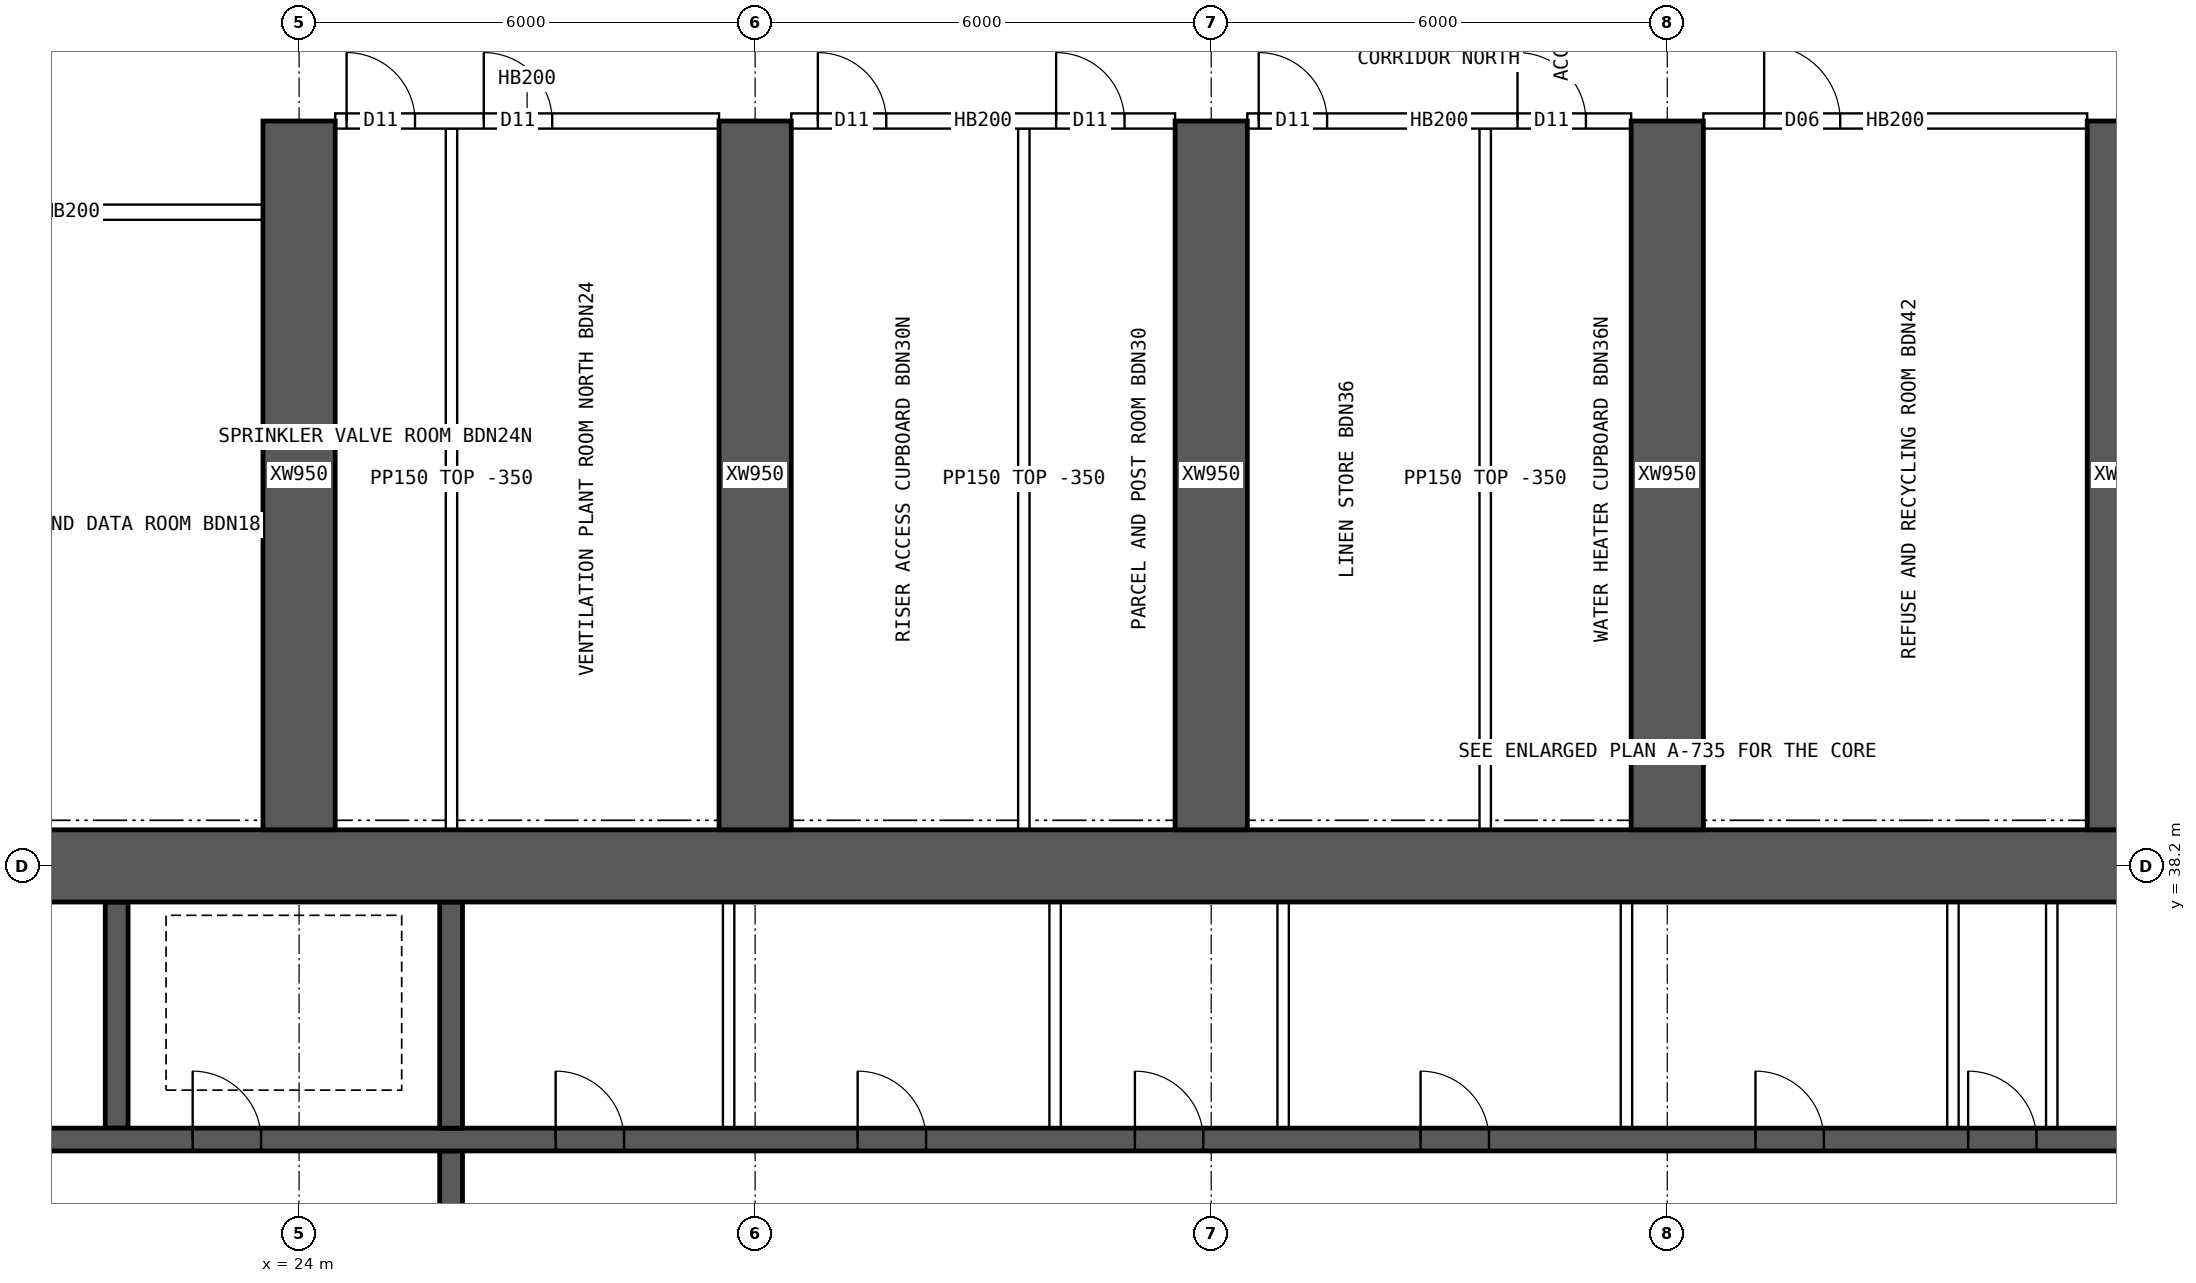
"""IFC4 building model, lengths in metres.
Left out: names, types, materials, properties, quantities, classifications, styles, units other than length and angle.
Written with IfcOpenShell. Run it as: python <this file> out.ifc"""

import sys

from ifc_helpers import new_model, si_unit, direction, frame, frame_2d, origin, place, context, subcontext, project, spatial, rectangle, extrude, element, fill, save


model = new_model("IFC4")
c1 = context("Model", 3, precision=1e-05, world=origin(), true_north=direction((0.0, 1.0)))
c2 = subcontext(c1, "Body", "Model", "MODEL_VIEW")
j1 = project(units=[si_unit("LENGTHUNIT", "METRE"), si_unit("PLANEANGLEUNIT", "RADIAN")], contexts=[c1])
p1 = place(None, origin())
s1 = spatial("IfcSite", under=j1, at=p1, CompositionType="ELEMENT")
p2 = place(p1, origin())
s2 = spatial("IfcBuilding", under=s1, at=p2, CompositionType="ELEMENT")
p3 = place(p2, frame((0.0, 0.0, 129.4)))
s3 = spatial("IfcBuildingStorey", under=s2, at=p3, CompositionType="ELEMENT", Elevation=129.4)
p4 = place(p3, frame((18.0, 38.2, 0.0), z_axis=(0.0, 0.0, 1.0), x_axis=(1.0, 0.0, 0.0)))
e1 = element("IfcWall", 1, at=p4, inside=s3, PredefinedType="SHEAR", context=c2, shape_type="SweptSolid", body=[
    extrude(rectangle(XDim=48.0, YDim=0.95, at=frame_2d((24.0, 0.0))), origin(), (0.0, 0.0, 1.0), 3.75),
])
p5 = place(p3, frame((18.475, 34.6, 0.0), z_axis=(0.0, 0.0, 1.0), x_axis=(1.0, 0.0, 0.0)))
e2 = element("IfcWall", 2, at=p5, inside=s3, PredefinedType="SHEAR", context=c2, shape_type="SweptSolid", body=[
    extrude(rectangle(XDim=47.05, YDim=0.3, at=frame_2d((23.525, 0.0))), origin(), (0.0, 0.0, 1.0), 3.75),
])
p6 = place(p5, frame((0.9, 0.0, 0.0)))
e3 = element("IfcOpeningElement", 3, at=p6, cuts=e2, PredefinedType="OPENING", context=c2, shape_type="SweptSolid", body=[
    extrude(rectangle(XDim=1.1, YDim=2.1, at=frame_2d((0.55, 1.05))), frame((0.0, 0.16, 0.0), z_axis=(0.0, -1.0, 0.0), x_axis=(1.0, 0.0, 0.0)), (0.0, 0.0, 1.0), 0.32),
])
p7 = place(p5, frame((45.05, 0.0, 0.0)))
e4 = element("IfcOpeningElement", 4, at=p7, cuts=e2, PredefinedType="OPENING", context=c2, shape_type="SweptSolid", body=[
    extrude(rectangle(XDim=1.1, YDim=2.1, at=frame_2d((0.55, 1.05))), frame((0.0, 0.16, 0.0), z_axis=(0.0, -1.0, 0.0), x_axis=(1.0, 0.0, 0.0)), (0.0, 0.0, 1.0), 0.32),
])
p8 = place(p5, frame((4.125, 0.0, 0.0)))
e5 = element("IfcOpeningElement", 5, at=p8, cuts=e2, PredefinedType="OPENING", context=c2, shape_type="SweptSolid", body=[
    extrude(rectangle(XDim=0.9, YDim=2.1, at=frame_2d((0.45, 1.05))), frame((0.0, 0.16, 0.0), z_axis=(0.0, -1.0, 0.0), x_axis=(1.0, 0.0, 0.0)), (0.0, 0.0, 1.0), 0.32),
])
p9 = place(p5, frame((42.025, 0.0, 0.0)))
e6 = element("IfcOpeningElement", 6, at=p9, cuts=e2, PredefinedType="OPENING", context=c2, shape_type="SweptSolid", body=[
    extrude(rectangle(XDim=0.9, YDim=2.1, at=frame_2d((0.45, 1.05))), frame((0.0, 0.16, 0.0), z_axis=(0.0, -1.0, 0.0), x_axis=(1.0, 0.0, 0.0)), (0.0, 0.0, 1.0), 0.32),
])
p10 = place(p5, frame((8.9, 0.0, 0.0)))
e7 = element("IfcOpeningElement", 7, at=p10, cuts=e2, PredefinedType="OPENING", context=c2, shape_type="SweptSolid", body=[
    extrude(rectangle(XDim=0.9, YDim=2.1, at=frame_2d((0.45, 1.05))), frame((0.0, 0.16, 0.0), z_axis=(0.0, -1.0, 0.0), x_axis=(1.0, 0.0, 0.0)), (0.0, 0.0, 1.0), 0.32),
])
p11 = place(p5, frame((12.874, 0.0, 0.0)))
e8 = element("IfcOpeningElement", 8, at=p11, cuts=e2, PredefinedType="OPENING", context=c2, shape_type="SweptSolid", body=[
    extrude(rectangle(XDim=0.9, YDim=2.1, at=frame_2d((0.45, 1.05))), frame((0.0, 0.16, 0.0), z_axis=(0.0, -1.0, 0.0), x_axis=(1.0, 0.0, 0.0)), (0.0, 0.0, 1.0), 0.32),
])
p12 = place(p5, frame((16.521, 0.0, 0.0)))
e9 = element("IfcOpeningElement", 9, at=p12, cuts=e2, PredefinedType="OPENING", context=c2, shape_type="SweptSolid", body=[
    extrude(rectangle(XDim=0.9, YDim=2.1, at=frame_2d((0.45, 1.05))), frame((0.0, 0.16, 0.0), z_axis=(0.0, -1.0, 0.0), x_axis=(1.0, 0.0, 0.0)), (0.0, 0.0, 1.0), 0.32),
])
p13 = place(p5, frame((20.28, 0.0, 0.0)))
e10 = element("IfcOpeningElement", 10, at=p13, cuts=e2, PredefinedType="OPENING", context=c2, shape_type="SweptSolid", body=[
    extrude(rectangle(XDim=0.9, YDim=2.1, at=frame_2d((0.45, 1.05))), frame((0.0, 0.16, 0.0), z_axis=(0.0, -1.0, 0.0), x_axis=(1.0, 0.0, 0.0)), (0.0, 0.0, 1.0), 0.32),
])
p14 = place(p5, frame((24.686, 0.0, 0.0)))
e11 = element("IfcOpeningElement", 11, at=p14, cuts=e2, PredefinedType="OPENING", context=c2, shape_type="SweptSolid", body=[
    extrude(rectangle(XDim=0.9, YDim=2.1, at=frame_2d((0.45, 1.05))), frame((0.0, 0.16, 0.0), z_axis=(0.0, -1.0, 0.0), x_axis=(1.0, 0.0, 0.0)), (0.0, 0.0, 1.0), 0.32),
])
p15 = place(p5, frame((27.483, 0.0, 0.0)))
e12 = element("IfcOpeningElement", 12, at=p15, cuts=e2, PredefinedType="OPENING", context=c2, shape_type="SweptSolid", body=[
    extrude(rectangle(XDim=0.9, YDim=2.1, at=frame_2d((0.45, 1.05))), frame((0.0, 0.16, 0.0), z_axis=(0.0, -1.0, 0.0), x_axis=(1.0, 0.0, 0.0)), (0.0, 0.0, 1.0), 0.32),
])
p16 = place(p5, frame((33.604, 0.0, 0.0)))
e13 = element("IfcOpeningElement", 13, at=p16, cuts=e2, PredefinedType="OPENING", context=c2, shape_type="SweptSolid", body=[
    extrude(rectangle(XDim=0.9, YDim=2.1, at=frame_2d((0.45, 1.05))), frame((0.0, 0.16, 0.0), z_axis=(0.0, -1.0, 0.0), x_axis=(1.0, 0.0, 0.0)), (0.0, 0.0, 1.0), 0.32),
])
p17 = place(p3, frame((26.0, 30.55, 0.0), z_axis=(0.0, 0.0, 1.0), x_axis=(0.0, 1.0, 0.0)))
e14 = element("IfcWall", 14, at=p17, inside=s3, PredefinedType="SHEAR", context=c2, shape_type="SweptSolid", body=[
    extrude(rectangle(XDim=3.9, YDim=0.3, at=frame_2d((1.95, 0.0))), origin(), (0.0, 0.0, 1.0), 3.75),
])
p18 = place(p17, frame((1.4, 0.0, 0.0)))
e15 = element("IfcOpeningElement", 15, at=p18, cuts=e14, PredefinedType="OPENING", context=c2, shape_type="SweptSolid", body=[
    extrude(rectangle(XDim=1.2, YDim=2.1, at=frame_2d((0.6, 1.05))), frame((0.0, 0.16, 0.0), z_axis=(0.0, -1.0, 0.0), x_axis=(1.0, 0.0, 0.0)), (0.0, 0.0, 1.0), 0.32),
])
for number, where, z_axis, x_axis in (
    (16, (21.6, 34.75, 0.0), (0.0, 0.0, 1.0), (0.0, 1.0, 0.0)),
    (17, (26.0, 34.75, 0.0), (0.0, 0.0, 1.0), (0.0, 1.0, 0.0)),
):
    element("IfcWall", number, at=place(p3, frame(where, z_axis=z_axis, x_axis=x_axis)), inside=s3, PredefinedType="SHEAR", context=c2, shape_type="SweptSolid", body=[
        extrude(rectangle(XDim=2.975, YDim=0.3, at=frame_2d((1.488, 0.0))), origin(), (0.0, 0.0, 1.0), 3.75),
    ])
for number, where, z_axis, x_axis in (
    (18, (24.0, 38.675, 0.0), (0.0, 0.0, 1.0), (0.0, 1.0, 0.0)),
    (19, (30.0, 38.675, 0.0), (0.0, 0.0, 1.0), (0.0, 1.0, 0.0)),
    (20, (36.0, 38.675, 0.0), (0.0, 0.0, 1.0), (0.0, 1.0, 0.0)),
    (21, (42.0, 38.675, 0.0), (0.0, 0.0, 1.0), (0.0, 1.0, 0.0)),
    (22, (48.0, 38.675, 0.0), (0.0, 0.0, 1.0), (0.0, 1.0, 0.0)),
):
    element("IfcWall", number, at=place(p3, frame(where, z_axis=z_axis, x_axis=x_axis)), inside=s3, PredefinedType="SHEAR", context=c2, shape_type="SweptSolid", body=[
        extrude(rectangle(XDim=9.325, YDim=0.95, at=frame_2d((4.663, 0.0))), origin(), (0.0, 0.0, 1.0), 3.75),
    ])
for number, where, z_axis, x_axis in (
    (23, (29.651, 34.75, 0.0), (0.0, 0.0, 1.0), (0.0, 1.0, 0.0)),
    (24, (33.946, 34.75, 0.0), (0.0, 0.0, 1.0), (0.0, 1.0, 0.0)),
    (25, (36.946, 34.75, 0.0), (0.0, 0.0, 1.0), (0.0, 1.0, 0.0)),
    (26, (41.463, 34.75, 0.0), (0.0, 0.0, 1.0), (0.0, 1.0, 0.0)),
    (27, (45.758, 34.75, 0.0), (0.0, 0.0, 1.0), (0.0, 1.0, 0.0)),
    (28, (47.058, 34.75, 0.0), (0.0, 0.0, 1.0), (0.0, 1.0, 0.0)),
):
    element("IfcWall", number, at=place(p3, frame(where, z_axis=z_axis, x_axis=x_axis)), inside=s3, PredefinedType="SOLIDWALL", context=c2, shape_type="SweptSolid", body=[
        extrude(rectangle(XDim=2.975, YDim=0.15, at=frame_2d((1.488, 0.0))), origin(), (0.0, 0.0, 1.0), 3.4),
    ])
p19 = place(p3, frame((24.475, 48.0, 0.0), z_axis=(0.0, 0.0, 1.0), x_axis=(1.0, 0.0, 0.0)))
e29 = element("IfcWall", 29, at=p19, inside=s3, PredefinedType="SOLIDWALL", context=c2, shape_type="SweptSolid", body=[
    extrude(rectangle(XDim=5.05, YDim=0.2, at=frame_2d((2.525, 0.0))), origin(), (0.0, 0.0, 1.0), 3.4),
])
p20 = place(p19, frame((0.15, 0.0, 0.0)))
e30 = element("IfcOpeningElement", 30, at=p20, cuts=e29, PredefinedType="OPENING", context=c2, shape_type="SweptSolid", body=[
    extrude(rectangle(XDim=0.9, YDim=2.1, at=frame_2d((0.45, 1.05))), frame((0.0, 0.11, 0.0), z_axis=(0.0, -1.0, 0.0), x_axis=(1.0, 0.0, 0.0)), (0.0, 0.0, 1.0), 0.22),
])
p21 = place(p19, frame((1.955, 0.0, 0.0)))
e31 = element("IfcOpeningElement", 31, at=p21, cuts=e29, PredefinedType="OPENING", context=c2, shape_type="SweptSolid", body=[
    extrude(rectangle(XDim=0.9, YDim=2.1, at=frame_2d((0.45, 1.05))), frame((0.0, 0.11, 0.0), z_axis=(0.0, -1.0, 0.0), x_axis=(1.0, 0.0, 0.0)), (0.0, 0.0, 1.0), 0.22),
])
p22 = place(p3, frame((30.475, 48.0, 0.0), z_axis=(0.0, 0.0, 1.0), x_axis=(1.0, 0.0, 0.0)))
e32 = element("IfcWall", 32, at=p22, inside=s3, PredefinedType="SOLIDWALL", context=c2, shape_type="SweptSolid", body=[
    extrude(rectangle(XDim=5.05, YDim=0.2, at=frame_2d((2.525, 0.0))), origin(), (0.0, 0.0, 1.0), 3.4),
])
p23 = place(p22, frame((0.35, 0.0, 0.0)))
e33 = element("IfcOpeningElement", 33, at=p23, cuts=e32, PredefinedType="OPENING", context=c2, shape_type="SweptSolid", body=[
    extrude(rectangle(XDim=0.9, YDim=2.1, at=frame_2d((0.45, 1.05))), frame((0.0, 0.11, 0.0), z_axis=(0.0, -1.0, 0.0), x_axis=(1.0, 0.0, 0.0)), (0.0, 0.0, 1.0), 0.22),
])
p24 = place(p22, frame((3.485, 0.0, 0.0)))
e34 = element("IfcOpeningElement", 34, at=p24, cuts=e32, PredefinedType="OPENING", context=c2, shape_type="SweptSolid", body=[
    extrude(rectangle(XDim=0.9, YDim=2.1, at=frame_2d((0.45, 1.05))), frame((0.0, 0.11, 0.0), z_axis=(0.0, -1.0, 0.0), x_axis=(1.0, 0.0, 0.0)), (0.0, 0.0, 1.0), 0.22),
])
p25 = place(p3, frame((36.475, 48.0, 0.0), z_axis=(0.0, 0.0, 1.0), x_axis=(1.0, 0.0, 0.0)))
e35 = element("IfcWall", 35, at=p25, inside=s3, PredefinedType="SOLIDWALL", context=c2, shape_type="SweptSolid", body=[
    extrude(rectangle(XDim=5.05, YDim=0.2, at=frame_2d((2.525, 0.0))), origin(), (0.0, 0.0, 1.0), 3.4),
])
p26 = place(p25, frame((0.15, 0.0, 0.0)))
e36 = element("IfcOpeningElement", 36, at=p26, cuts=e35, PredefinedType="OPENING", context=c2, shape_type="SweptSolid", body=[
    extrude(rectangle(XDim=0.9, YDim=2.1, at=frame_2d((0.45, 1.05))), frame((0.0, 0.11, 0.0), z_axis=(0.0, -1.0, 0.0), x_axis=(1.0, 0.0, 0.0)), (0.0, 0.0, 1.0), 0.22),
])
p27 = place(p25, frame((3.555, 0.0, 0.0)))
e37 = element("IfcOpeningElement", 37, at=p27, cuts=e35, PredefinedType="OPENING", context=c2, shape_type="SweptSolid", body=[
    extrude(rectangle(XDim=0.9, YDim=2.1, at=frame_2d((0.45, 1.05))), frame((0.0, 0.11, 0.0), z_axis=(0.0, -1.0, 0.0), x_axis=(1.0, 0.0, 0.0)), (0.0, 0.0, 1.0), 0.22),
])
p28 = place(p3, frame((42.475, 48.0, 0.0), z_axis=(0.0, 0.0, 1.0), x_axis=(1.0, 0.0, 0.0)))
e38 = element("IfcWall", 38, at=p28, inside=s3, PredefinedType="SOLIDWALL", context=c2, shape_type="SweptSolid", body=[
    extrude(rectangle(XDim=5.05, YDim=0.2, at=frame_2d((2.525, 0.0))), origin(), (0.0, 0.0, 1.0), 3.4),
])
p29 = place(p28, frame((0.8, 0.0, 0.0)))
e39 = element("IfcOpeningElement", 39, at=p29, cuts=e38, PredefinedType="OPENING", context=c2, shape_type="SweptSolid", body=[
    extrude(rectangle(XDim=1.0, YDim=2.1, at=frame_2d((0.5, 1.05))), frame((0.0, 0.11, 0.0), z_axis=(0.0, -1.0, 0.0), x_axis=(1.0, 0.0, 0.0)), (0.0, 0.0, 1.0), 0.22),
])
p30 = place(p3, frame((18.475, 46.8, 0.0), z_axis=(0.0, 0.0, 1.0), x_axis=(1.0, 0.0, 0.0)))
e40 = element("IfcWall", 40, at=p30, inside=s3, PredefinedType="SOLIDWALL", context=c2, shape_type="SweptSolid", body=[
    extrude(rectangle(XDim=5.05, YDim=0.2, at=frame_2d((2.525, 0.0))), origin(), (0.0, 0.0, 1.0), 3.4),
])
p31 = place(p30, frame((0.8, 0.0, 0.0)))
e41 = element("IfcOpeningElement", 41, at=p31, cuts=e40, PredefinedType="OPENING", context=c2, shape_type="SweptSolid", body=[
    extrude(rectangle(XDim=1.0, YDim=2.1, at=frame_2d((0.5, 1.05))), frame((0.0, 0.11, 0.0), z_axis=(0.0, -1.0, 0.0), x_axis=(1.0, 0.0, 0.0)), (0.0, 0.0, 1.0), 0.22),
])
for number, where, z_axis, x_axis in (
    (42, (26.005, 38.675, 0.0), (0.0, 0.0, 1.0), (0.0, 1.0, 0.0)),
    (43, (33.535, 38.675, 0.0), (0.0, 0.0, 1.0), (0.0, 1.0, 0.0)),
    (44, (39.605, 38.675, 0.0), (0.0, 0.0, 1.0), (0.0, 1.0, 0.0)),
):
    element("IfcWall", number, at=place(p3, frame(where, z_axis=z_axis, x_axis=x_axis)), inside=s3, PredefinedType="PARTITIONING", context=c2, shape_type="SweptSolid", body=[
        extrude(rectangle(XDim=9.225, YDim=0.15, at=frame_2d((4.612, 0.0))), origin(), (0.0, 0.0, 1.0), 3.4),
    ])
p32 = place(p8, origin())
e45 = element("IfcDoor", 45, at=p32, inside=s3, OperationType="SINGLE_SWING_LEFT", PredefinedType="DOOR", context=c2, shape_type="SweptSolid", body=[
    extrude(rectangle(XDim=0.9, YDim=2.1, at=frame_2d((0.45, 1.05))), frame((0.0, 0.025, 0.0), z_axis=(0.0, -1.0, 0.0), x_axis=(1.0, 0.0, 0.0)), (0.0, 0.0, 1.0), 0.05),
])
fill(e5, e45)
p33 = place(p10, origin())
e46 = element("IfcDoor", 46, at=p33, inside=s3, OperationType="SINGLE_SWING_LEFT", PredefinedType="DOOR", context=c2, shape_type="SweptSolid", body=[
    extrude(rectangle(XDim=0.9, YDim=2.1, at=frame_2d((0.45, 1.05))), frame((0.0, 0.025, 0.0), z_axis=(0.0, -1.0, 0.0), x_axis=(1.0, 0.0, 0.0)), (0.0, 0.0, 1.0), 0.05),
])
fill(e7, e46)
p34 = place(p11, origin())
e47 = element("IfcDoor", 47, at=p34, inside=s3, OperationType="SINGLE_SWING_LEFT", PredefinedType="DOOR", context=c2, shape_type="SweptSolid", body=[
    extrude(rectangle(XDim=0.9, YDim=2.1, at=frame_2d((0.45, 1.05))), frame((0.0, 0.025, 0.0), z_axis=(0.0, -1.0, 0.0), x_axis=(1.0, 0.0, 0.0)), (0.0, 0.0, 1.0), 0.05),
])
fill(e8, e47)
p35 = place(p12, origin())
e48 = element("IfcDoor", 48, at=p35, inside=s3, OperationType="SINGLE_SWING_LEFT", PredefinedType="DOOR", context=c2, shape_type="SweptSolid", body=[
    extrude(rectangle(XDim=0.9, YDim=2.1, at=frame_2d((0.45, 1.05))), frame((0.0, 0.025, 0.0), z_axis=(0.0, -1.0, 0.0), x_axis=(1.0, 0.0, 0.0)), (0.0, 0.0, 1.0), 0.05),
])
fill(e9, e48)
p36 = place(p13, origin())
e49 = element("IfcDoor", 49, at=p36, inside=s3, OperationType="SINGLE_SWING_LEFT", PredefinedType="DOOR", context=c2, shape_type="SweptSolid", body=[
    extrude(rectangle(XDim=0.9, YDim=2.1, at=frame_2d((0.45, 1.05))), frame((0.0, 0.025, 0.0), z_axis=(0.0, -1.0, 0.0), x_axis=(1.0, 0.0, 0.0)), (0.0, 0.0, 1.0), 0.05),
])
fill(e10, e49)
p37 = place(p14, origin())
e50 = element("IfcDoor", 50, at=p37, inside=s3, OperationType="SINGLE_SWING_LEFT", PredefinedType="DOOR", context=c2, shape_type="SweptSolid", body=[
    extrude(rectangle(XDim=0.9, YDim=2.1, at=frame_2d((0.45, 1.05))), frame((0.0, 0.025, 0.0), z_axis=(0.0, -1.0, 0.0), x_axis=(1.0, 0.0, 0.0)), (0.0, 0.0, 1.0), 0.05),
])
fill(e11, e50)
p38 = place(p15, origin())
e51 = element("IfcDoor", 51, at=p38, inside=s3, OperationType="SINGLE_SWING_LEFT", PredefinedType="DOOR", context=c2, shape_type="SweptSolid", body=[
    extrude(rectangle(XDim=0.9, YDim=2.1, at=frame_2d((0.45, 1.05))), frame((0.0, 0.025, 0.0), z_axis=(0.0, -1.0, 0.0), x_axis=(1.0, 0.0, 0.0)), (0.0, 0.0, 1.0), 0.05),
])
fill(e12, e51)
p39 = place(p20, origin())
e52 = element("IfcDoor", 52, at=p39, inside=s3, OperationType="SINGLE_SWING_LEFT", PredefinedType="DOOR", context=c2, shape_type="SweptSolid", body=[
    extrude(rectangle(XDim=0.9, YDim=2.1, at=frame_2d((0.45, 1.05))), frame((0.0, 0.025, 0.0), z_axis=(0.0, -1.0, 0.0), x_axis=(1.0, 0.0, 0.0)), (0.0, 0.0, 1.0), 0.05),
])
fill(e30, e52)
p40 = place(p21, origin())
e53 = element("IfcDoor", 53, at=p40, inside=s3, OperationType="SINGLE_SWING_LEFT", PredefinedType="DOOR", context=c2, shape_type="SweptSolid", body=[
    extrude(rectangle(XDim=0.9, YDim=2.1, at=frame_2d((0.45, 1.05))), frame((0.0, 0.025, 0.0), z_axis=(0.0, -1.0, 0.0), x_axis=(1.0, 0.0, 0.0)), (0.0, 0.0, 1.0), 0.05),
])
fill(e31, e53)
p41 = place(p23, origin())
e54 = element("IfcDoor", 54, at=p41, inside=s3, OperationType="SINGLE_SWING_LEFT", PredefinedType="DOOR", context=c2, shape_type="SweptSolid", body=[
    extrude(rectangle(XDim=0.9, YDim=2.1, at=frame_2d((0.45, 1.05))), frame((0.0, 0.025, 0.0), z_axis=(0.0, -1.0, 0.0), x_axis=(1.0, 0.0, 0.0)), (0.0, 0.0, 1.0), 0.05),
])
fill(e33, e54)
p42 = place(p24, origin())
e55 = element("IfcDoor", 55, at=p42, inside=s3, OperationType="SINGLE_SWING_LEFT", PredefinedType="DOOR", context=c2, shape_type="SweptSolid", body=[
    extrude(rectangle(XDim=0.9, YDim=2.1, at=frame_2d((0.45, 1.05))), frame((0.0, 0.025, 0.0), z_axis=(0.0, -1.0, 0.0), x_axis=(1.0, 0.0, 0.0)), (0.0, 0.0, 1.0), 0.05),
])
fill(e34, e55)
p43 = place(p26, origin())
e56 = element("IfcDoor", 56, at=p43, inside=s3, OperationType="SINGLE_SWING_LEFT", PredefinedType="DOOR", context=c2, shape_type="SweptSolid", body=[
    extrude(rectangle(XDim=0.9, YDim=2.1, at=frame_2d((0.45, 1.05))), frame((0.0, 0.025, 0.0), z_axis=(0.0, -1.0, 0.0), x_axis=(1.0, 0.0, 0.0)), (0.0, 0.0, 1.0), 0.05),
])
fill(e36, e56)
p44 = place(p27, origin())
e57 = element("IfcDoor", 57, at=p44, inside=s3, OperationType="SINGLE_SWING_LEFT", PredefinedType="DOOR", context=c2, shape_type="SweptSolid", body=[
    extrude(rectangle(XDim=0.9, YDim=2.1, at=frame_2d((0.45, 1.05))), frame((0.0, 0.025, 0.0), z_axis=(0.0, -1.0, 0.0), x_axis=(1.0, 0.0, 0.0)), (0.0, 0.0, 1.0), 0.05),
])
fill(e37, e57)
p45 = place(p29, origin())
e58 = element("IfcDoor", 58, at=p45, inside=s3, OperationType="SINGLE_SWING_LEFT", PredefinedType="DOOR", context=c2, shape_type="SweptSolid", body=[
    extrude(rectangle(XDim=1.0, YDim=2.1, at=frame_2d((0.5, 1.05))), frame((0.0, 0.025, 0.0), z_axis=(0.0, -1.0, 0.0), x_axis=(1.0, 0.0, 0.0)), (0.0, 0.0, 1.0), 0.05),
])
fill(e39, e58)
save(model, sys.argv[1])
